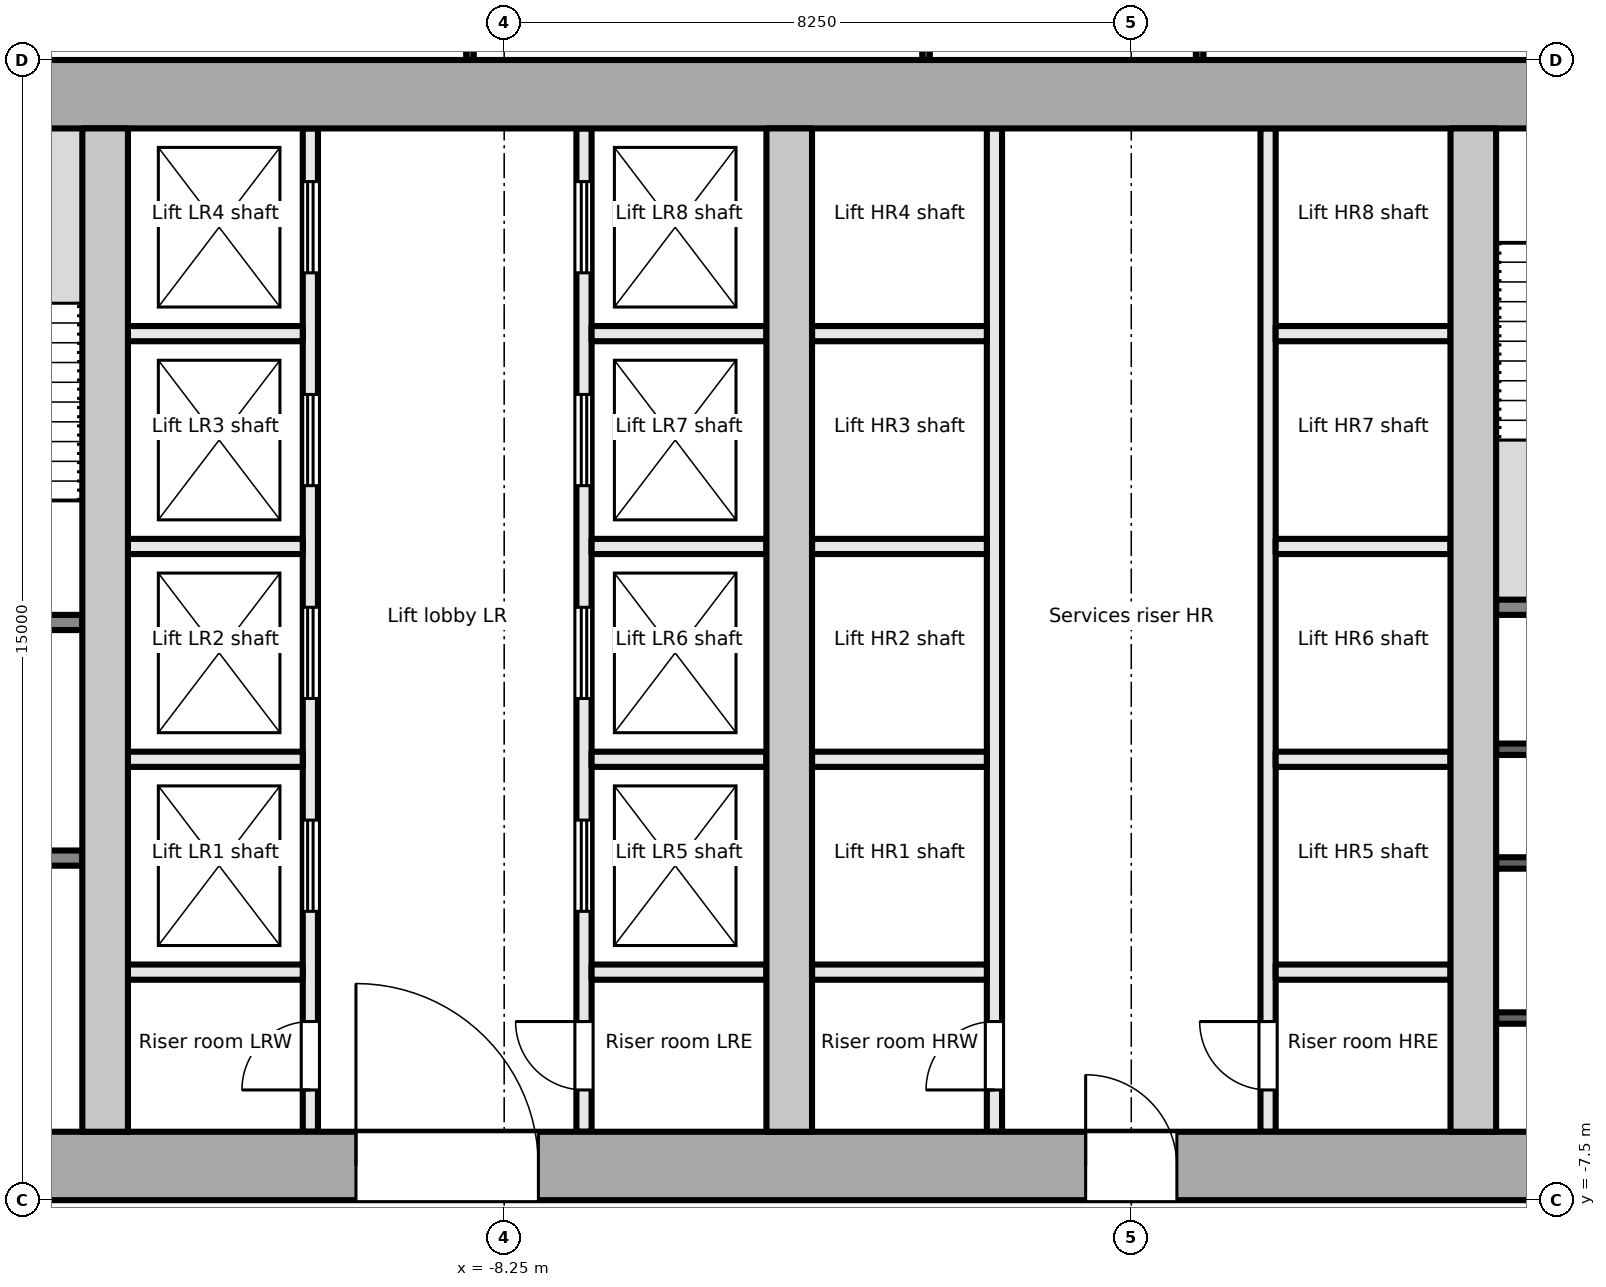
"""IFC4 building model, lengths in metres.
Left out: names, types, materials, properties, quantities, classifications, styles, units other than length and angle.
Written with IfcOpenShell. Run it as: python <this file> out.ifc"""

import sys

from ifc_helpers import new_model, si_unit, direction, frame, frame_2d, origin, place, context, subcontext, project, spatial, rectangle, extrude, element, fill, save


model = new_model("IFC4")
c1 = context("Model", 3, precision=1e-05, world=origin(), true_north=direction((0.0, 1.0)))
c2 = subcontext(c1, "Body", "Model", "MODEL_VIEW")
j1 = project(units=[si_unit("LENGTHUNIT", "METRE"), si_unit("PLANEANGLEUNIT", "RADIAN")], contexts=[c1])
p1 = place(None, origin())
s1 = spatial("IfcSite", under=j1, at=p1, CompositionType="ELEMENT")
p2 = place(p1, origin())
s2 = spatial("IfcBuilding", under=s1, at=p2, CompositionType="ELEMENT")
p3 = place(p2, frame((0.0, 0.0, 134.1)))
s3 = spatial("IfcBuildingStorey", under=s2, at=p3, CompositionType="ELEMENT", Elevation=134.1)
p4 = place(p3, frame((-18.0, -7.05, -0.2), z_axis=(0.0, 0.0, 1.0), x_axis=(1.0, 0.0, 0.0)))
e1 = element("IfcWall", 1, at=p4, inside=s3, PredefinedType="SHEAR", context=c2, shape_type="SweptSolid", body=[
    extrude(rectangle(XDim=36.0, YDim=0.9, at=frame_2d((18.0, 0.0))), origin(), (0.0, 0.0, 1.0), 4.0),
])
p5 = place(p4, frame((7.8, 0.0, 0.2)))
e2 = element("IfcOpeningElement", 2, at=p5, cuts=e1, PredefinedType="OPENING", context=c2, shape_type="SweptSolid", body=[
    extrude(rectangle(XDim=2.4, YDim=2.1, at=frame_2d((1.2, 1.05))), frame((0.0, 0.46, 0.0), z_axis=(0.0, -1.0, 0.0), x_axis=(1.0, 0.0, 0.0)), (0.0, 0.0, 1.0), 0.921),
])
p6 = place(p4, frame((17.4, 0.0, 0.2)))
e3 = element("IfcOpeningElement", 3, at=p6, cuts=e1, PredefinedType="OPENING", context=c2, shape_type="SweptSolid", body=[
    extrude(rectangle(XDim=1.2, YDim=2.1, at=frame_2d((0.6, 1.05))), frame((0.0, 0.46, 0.0), z_axis=(0.0, -1.0, 0.0), x_axis=(1.0, 0.0, 0.0)), (0.0, 0.0, 1.0), 0.921),
])
p7 = place(p4, frame((26.1, 0.0, 0.2)))
e4 = element("IfcOpeningElement", 4, at=p7, cuts=e1, PredefinedType="OPENING", context=c2, shape_type="SweptSolid", body=[
    extrude(rectangle(XDim=2.4, YDim=2.1, at=frame_2d((1.2, 1.05))), frame((0.0, 0.46, 0.0), z_axis=(0.0, -1.0, 0.0), x_axis=(1.0, 0.0, 0.0)), (0.0, 0.0, 1.0), 0.921),
])
p8 = place(p3, frame((-18.0, 7.05, -0.2), z_axis=(0.0, 0.0, 1.0), x_axis=(1.0, 0.0, 0.0)))
e5 = element("IfcWall", 5, at=p8, inside=s3, PredefinedType="SHEAR", context=c2, shape_type="SweptSolid", body=[
    extrude(rectangle(XDim=36.0, YDim=0.9, at=frame_2d((18.0, 0.0))), origin(), (0.0, 0.0, 1.0), 4.0),
])
for number, where, z_axis, x_axis in (
    (6, (-13.5, -6.6, -0.2), (0.0, 0.0, 1.0), (0.0, 1.0, 0.0)),
    (7, (-4.5, -6.6, -0.2), (0.0, 0.0, 1.0), (0.0, 1.0, 0.0)),
    (8, (4.5, -6.6, -0.2), (0.0, 0.0, 1.0), (0.0, 1.0, 0.0)),
):
    element("IfcWall", number, at=place(p3, frame(where, z_axis=z_axis, x_axis=x_axis)), inside=s3, PredefinedType="SHEAR", context=c2, shape_type="SweptSolid", body=[
        extrude(rectangle(XDim=13.2, YDim=0.6, at=frame_2d((6.6, 0.0))), origin(), (0.0, 0.0, 1.0), 4.0),
    ])
p9 = place(p3, frame((-17.1, -3.0, 0.0), z_axis=(0.0, 0.0, 1.0), x_axis=(1.0, 0.0, 0.0)))
e9 = element("IfcWall", 9, at=p9, inside=s3, PredefinedType="PARTITIONING", context=c2, shape_type="SweptSolid", body=[
    extrude(rectangle(XDim=3.3, YDim=0.2, at=frame_2d((1.65, 0.0))), origin(), (0.0, 0.0, 1.0), 3.8),
])
p10 = place(p9, frame((1.1, 0.0, 0.0)))
e10 = element("IfcOpeningElement", 10, at=p10, cuts=e9, PredefinedType="OPENING", context=c2, shape_type="SweptSolid", body=[
    extrude(rectangle(XDim=1.1, YDim=2.1, at=frame_2d((0.55, 1.05))), frame((0.0, 0.111, 0.0), z_axis=(0.0, -1.0, 0.0), x_axis=(1.0, 0.0, 0.0)), (0.0, 0.0, 1.0), 0.221),
])
p11 = place(p3, frame((-17.1, 0.1, 0.0), z_axis=(0.0, 0.0, 1.0), x_axis=(1.0, 0.0, 0.0)))
e11 = element("IfcWall", 11, at=p11, inside=s3, PredefinedType="PARTITIONING", context=c2, shape_type="SweptSolid", body=[
    extrude(rectangle(XDim=3.3, YDim=0.2, at=frame_2d((1.65, 0.0))), origin(), (0.0, 0.0, 1.0), 3.8),
])
p12 = place(p11, frame((1.1, 0.0, 0.0)))
e12 = element("IfcOpeningElement", 12, at=p12, cuts=e11, PredefinedType="OPENING", context=c2, shape_type="SweptSolid", body=[
    extrude(rectangle(XDim=1.1, YDim=2.1, at=frame_2d((0.55, 1.05))), frame((0.0, 0.111, 0.0), z_axis=(0.0, -1.0, 0.0), x_axis=(1.0, 0.0, 0.0)), (0.0, 0.0, 1.0), 0.221),
])
p13 = place(p3, frame((-10.8, -6.6, 0.0), z_axis=(0.0, 0.0, 1.0), x_axis=(0.0, 1.0, 0.0)))
e13 = element("IfcWall", 13, at=p13, inside=s3, PredefinedType="PARTITIONING", context=c2, shape_type="SweptSolid", body=[
    extrude(rectangle(XDim=13.2, YDim=0.2, at=frame_2d((6.6, 0.0))), origin(), (0.0, 0.0, 1.0), 3.8),
])
p14 = place(p13, frame((0.55, 0.0, 0.0)))
e14 = element("IfcOpeningElement", 14, at=p14, cuts=e13, PredefinedType="OPENING", context=c2, shape_type="SweptSolid", body=[
    extrude(rectangle(XDim=0.9, YDim=2.1, at=frame_2d((0.45, 1.05))), frame((0.0, 0.111, 0.0), z_axis=(0.0, -1.0, 0.0), x_axis=(1.0, 0.0, 0.0)), (0.0, 0.0, 1.0), 0.221),
])
p15 = place(p13, frame((2.9, 0.0, 0.0)))
e15 = element("IfcOpeningElement", 15, at=p15, cuts=e13, PredefinedType="OPENING", context=c2, shape_type="SweptSolid", body=[
    extrude(rectangle(XDim=1.2, YDim=2.1, at=frame_2d((0.6, 1.05))), frame((0.0, 0.111, 0.0), z_axis=(0.0, -1.0, 0.0), x_axis=(1.0, 0.0, 0.0)), (0.0, 0.0, 1.0), 0.221),
])
p16 = place(p13, frame((5.7, 0.0, 0.0)))
e16 = element("IfcOpeningElement", 16, at=p16, cuts=e13, PredefinedType="OPENING", context=c2, shape_type="SweptSolid", body=[
    extrude(rectangle(XDim=1.2, YDim=2.1, at=frame_2d((0.6, 1.05))), frame((0.0, 0.111, 0.0), z_axis=(0.0, -1.0, 0.0), x_axis=(1.0, 0.0, 0.0)), (0.0, 0.0, 1.0), 0.221),
])
p17 = place(p13, frame((8.5, 0.0, 0.0)))
e17 = element("IfcOpeningElement", 17, at=p17, cuts=e13, PredefinedType="OPENING", context=c2, shape_type="SweptSolid", body=[
    extrude(rectangle(XDim=1.2, YDim=2.1, at=frame_2d((0.6, 1.05))), frame((0.0, 0.111, 0.0), z_axis=(0.0, -1.0, 0.0), x_axis=(1.0, 0.0, 0.0)), (0.0, 0.0, 1.0), 0.221),
])
p18 = place(p13, frame((11.3, 0.0, 0.0)))
e18 = element("IfcOpeningElement", 18, at=p18, cuts=e13, PredefinedType="OPENING", context=c2, shape_type="SweptSolid", body=[
    extrude(rectangle(XDim=1.2, YDim=2.1, at=frame_2d((0.6, 1.05))), frame((0.0, 0.111, 0.0), z_axis=(0.0, -1.0, 0.0), x_axis=(1.0, 0.0, 0.0)), (0.0, 0.0, 1.0), 0.221),
])
p19 = place(p3, frame((-7.2, -6.6, 0.0), z_axis=(0.0, 0.0, 1.0), x_axis=(0.0, 1.0, 0.0)))
e19 = element("IfcWall", 19, at=p19, inside=s3, PredefinedType="PARTITIONING", context=c2, shape_type="SweptSolid", body=[
    extrude(rectangle(XDim=13.2, YDim=0.2, at=frame_2d((6.6, 0.0))), origin(), (0.0, 0.0, 1.0), 3.8),
])
p20 = place(p19, frame((0.55, 0.0, 0.0)))
e20 = element("IfcOpeningElement", 20, at=p20, cuts=e19, PredefinedType="OPENING", context=c2, shape_type="SweptSolid", body=[
    extrude(rectangle(XDim=0.9, YDim=2.1, at=frame_2d((0.45, 1.05))), frame((0.0, 0.111, 0.0), z_axis=(0.0, -1.0, 0.0), x_axis=(1.0, 0.0, 0.0)), (0.0, 0.0, 1.0), 0.221),
])
p21 = place(p19, frame((2.9, 0.0, 0.0)))
e21 = element("IfcOpeningElement", 21, at=p21, cuts=e19, PredefinedType="OPENING", context=c2, shape_type="SweptSolid", body=[
    extrude(rectangle(XDim=1.2, YDim=2.1, at=frame_2d((0.6, 1.05))), frame((0.0, 0.111, 0.0), z_axis=(0.0, -1.0, 0.0), x_axis=(1.0, 0.0, 0.0)), (0.0, 0.0, 1.0), 0.221),
])
p22 = place(p19, frame((5.7, 0.0, 0.0)))
e22 = element("IfcOpeningElement", 22, at=p22, cuts=e19, PredefinedType="OPENING", context=c2, shape_type="SweptSolid", body=[
    extrude(rectangle(XDim=1.2, YDim=2.1, at=frame_2d((0.6, 1.05))), frame((0.0, 0.111, 0.0), z_axis=(0.0, -1.0, 0.0), x_axis=(1.0, 0.0, 0.0)), (0.0, 0.0, 1.0), 0.221),
])
p23 = place(p19, frame((8.5, 0.0, 0.0)))
e23 = element("IfcOpeningElement", 23, at=p23, cuts=e19, PredefinedType="OPENING", context=c2, shape_type="SweptSolid", body=[
    extrude(rectangle(XDim=1.2, YDim=2.1, at=frame_2d((0.6, 1.05))), frame((0.0, 0.111, 0.0), z_axis=(0.0, -1.0, 0.0), x_axis=(1.0, 0.0, 0.0)), (0.0, 0.0, 1.0), 0.221),
])
p24 = place(p19, frame((11.3, 0.0, 0.0)))
e24 = element("IfcOpeningElement", 24, at=p24, cuts=e19, PredefinedType="OPENING", context=c2, shape_type="SweptSolid", body=[
    extrude(rectangle(XDim=1.2, YDim=2.1, at=frame_2d((0.6, 1.05))), frame((0.0, 0.111, 0.0), z_axis=(0.0, -1.0, 0.0), x_axis=(1.0, 0.0, 0.0)), (0.0, 0.0, 1.0), 0.221),
])
for number, where, z_axis, x_axis in (
    (25, (-13.2, -1.7, 0.0), (0.0, 0.0, 1.0), (1.0, 0.0, 0.0)),
    (26, (-13.2, 1.1, 0.0), (0.0, 0.0, 1.0), (1.0, 0.0, 0.0)),
    (27, (-13.2, 3.9, 0.0), (0.0, 0.0, 1.0), (1.0, 0.0, 0.0)),
    (28, (-13.2, -4.5, 0.0), (0.0, 0.0, 1.0), (1.0, 0.0, 0.0)),
    (29, (-7.1, -1.7, 0.0), (0.0, 0.0, 1.0), (1.0, 0.0, 0.0)),
    (30, (-7.1, 1.1, 0.0), (0.0, 0.0, 1.0), (1.0, 0.0, 0.0)),
    (31, (-7.1, 3.9, 0.0), (0.0, 0.0, 1.0), (1.0, 0.0, 0.0)),
    (32, (-7.1, -4.5, 0.0), (0.0, 0.0, 1.0), (1.0, 0.0, 0.0)),
):
    element("IfcWall", number, at=place(p3, frame(where, z_axis=z_axis, x_axis=x_axis)), inside=s3, PredefinedType="PARTITIONING", context=c2, shape_type="SweptSolid", body=[
        extrude(rectangle(XDim=2.3, YDim=0.2, at=frame_2d((1.15, 0.0))), origin(), (0.0, 0.0, 1.0), 3.8),
    ])
p25 = place(p3, frame((-1.8, -6.6, 0.0), z_axis=(0.0, 0.0, 1.0), x_axis=(0.0, 1.0, 0.0)))
e33 = element("IfcWall", 33, at=p25, inside=s3, PredefinedType="PARTITIONING", context=c2, shape_type="SweptSolid", body=[
    extrude(rectangle(XDim=13.2, YDim=0.2, at=frame_2d((6.6, 0.0))), origin(), (0.0, 0.0, 1.0), 3.8),
])
p26 = place(p25, frame((0.55, 0.0, 0.0)))
e34 = element("IfcOpeningElement", 34, at=p26, cuts=e33, PredefinedType="OPENING", context=c2, shape_type="SweptSolid", body=[
    extrude(rectangle(XDim=0.9, YDim=2.1, at=frame_2d((0.45, 1.05))), frame((0.0, 0.111, 0.0), z_axis=(0.0, -1.0, 0.0), x_axis=(1.0, 0.0, 0.0)), (0.0, 0.0, 1.0), 0.221),
])
p27 = place(p3, frame((1.8, -6.6, 0.0), z_axis=(0.0, 0.0, 1.0), x_axis=(0.0, 1.0, 0.0)))
e35 = element("IfcWall", 35, at=p27, inside=s3, PredefinedType="PARTITIONING", context=c2, shape_type="SweptSolid", body=[
    extrude(rectangle(XDim=13.2, YDim=0.2, at=frame_2d((6.6, 0.0))), origin(), (0.0, 0.0, 1.0), 3.8),
])
p28 = place(p27, frame((0.55, 0.0, 0.0)))
e36 = element("IfcOpeningElement", 36, at=p28, cuts=e35, PredefinedType="OPENING", context=c2, shape_type="SweptSolid", body=[
    extrude(rectangle(XDim=0.9, YDim=2.1, at=frame_2d((0.45, 1.05))), frame((0.0, 0.111, 0.0), z_axis=(0.0, -1.0, 0.0), x_axis=(1.0, 0.0, 0.0)), (0.0, 0.0, 1.0), 0.221),
])
for number, where, z_axis, x_axis in (
    (37, (-4.2, -1.7, 0.0), (0.0, 0.0, 1.0), (1.0, 0.0, 0.0)),
    (38, (-4.2, 1.1, 0.0), (0.0, 0.0, 1.0), (1.0, 0.0, 0.0)),
    (39, (-4.2, 3.9, 0.0), (0.0, 0.0, 1.0), (1.0, 0.0, 0.0)),
    (40, (-4.2, -4.5, 0.0), (0.0, 0.0, 1.0), (1.0, 0.0, 0.0)),
    (41, (1.9, -1.7, 0.0), (0.0, 0.0, 1.0), (1.0, 0.0, 0.0)),
    (42, (1.9, 1.1, 0.0), (0.0, 0.0, 1.0), (1.0, 0.0, 0.0)),
    (43, (1.9, 3.9, 0.0), (0.0, 0.0, 1.0), (1.0, 0.0, 0.0)),
    (44, (1.9, -4.5, 0.0), (0.0, 0.0, 1.0), (1.0, 0.0, 0.0)),
):
    element("IfcWall", number, at=place(p3, frame(where, z_axis=z_axis, x_axis=x_axis)), inside=s3, PredefinedType="PARTITIONING", context=c2, shape_type="SweptSolid", body=[
        extrude(rectangle(XDim=2.3, YDim=0.2, at=frame_2d((1.15, 0.0))), origin(), (0.0, 0.0, 1.0), 3.8),
    ])
p29 = place(p3, frame((4.8, 0.3, 0.0), z_axis=(0.0, 0.0, 1.0), x_axis=(1.0, 0.0, 0.0)))
e45 = element("IfcWall", 45, at=p29, inside=s3, PredefinedType="PARTITIONING", context=c2, shape_type="SweptSolid", body=[
    extrude(rectangle(XDim=3.15, YDim=0.2, at=frame_2d((1.575, 0.0))), origin(), (0.0, 0.0, 1.0), 3.8),
])
for number, where, z_axis, x_axis in (
    (46, (4.8, -5.104, 0.0), (0.0, 0.0, 1.0), (1.0, 0.0, 0.0)),
    (47, (4.8, -3.064, 0.0), (0.0, 0.0, 1.0), (1.0, 0.0, 0.0)),
    (48, (4.8, -1.568, 0.0), (0.0, 0.0, 1.0), (1.0, 0.0, 0.0)),
):
    element("IfcWall", number, at=place(p3, frame(where, z_axis=z_axis, x_axis=x_axis)), inside=s3, PredefinedType="PARTITIONING", context=c2, shape_type="SweptSolid", body=[
        extrude(rectangle(XDim=3.15, YDim=0.15, at=frame_2d((1.575, 0.0))), origin(), (0.0, 0.0, 1.0), 3.8),
    ])
p30 = place(p3, frame((-8.7, 7.5, 0.0), z_axis=(0.0, 0.0, 1.0), x_axis=(0.0, 1.0, 0.0)))
e49 = element("IfcWall", 49, at=p30, inside=s3, PredefinedType="PARTITIONING", context=c2, shape_type="SweptSolid", body=[
    extrude(rectangle(XDim=2.95, YDim=0.1, at=frame_2d((1.475, 0.0))), origin(), (0.0, 0.0, 1.0), 3.8),
])
p31 = place(p30, frame((0.575, 0.0, 0.9)))
e50 = element("IfcOpeningElement", 50, at=p31, cuts=e49, PredefinedType="OPENING", context=c2, shape_type="SweptSolid", body=[
    extrude(rectangle(XDim=1.8, YDim=1.2, at=frame_2d((0.9, 0.6))), frame((0.0, 0.061, 0.0), z_axis=(0.0, -1.0, 0.0), x_axis=(1.0, 0.0, 0.0)), (0.0, 0.0, 1.0), 0.121),
])
for number, where, z_axis, x_axis in (
    (51, (-2.7, 10.45, 0.0), (0.0, 0.0, 1.0), (0.0, -1.0, 0.0)),
    (52, (0.9, 10.45, 0.0), (0.0, 0.0, 1.0), (0.0, -1.0, 0.0)),
):
    element("IfcWall", number, at=place(p3, frame(where, z_axis=z_axis, x_axis=x_axis)), inside=s3, PredefinedType="PARTITIONING", context=c2, shape_type="SweptSolid", body=[
        extrude(rectangle(XDim=2.95, YDim=0.1, at=frame_2d((1.475, 0.0))), origin(), (0.0, 0.0, 1.0), 3.8),
    ])
p32 = place(p14, origin())
e53 = element("IfcDoor", 53, at=p32, inside=s3, OperationType="SINGLE_SWING_LEFT", PredefinedType="DOOR", context=c2, shape_type="SweptSolid", body=[
    extrude(rectangle(XDim=0.9, YDim=2.1, at=frame_2d((0.45, 1.05))), frame((0.0, 0.025, 0.0), z_axis=(0.0, -1.0, 0.0), x_axis=(1.0, 0.0, 0.0)), (0.0, 0.0, 1.0), 0.05),
])
fill(e14, e53)
p33 = place(p15, origin())
e54 = element("IfcDoor", 54, at=p33, inside=s3, OperationType="DOUBLE_DOOR_SLIDING", PredefinedType="DOOR", context=c2, shape_type="SweptSolid", body=[
    extrude(rectangle(XDim=1.2, YDim=2.1, at=frame_2d((0.6, 1.05))), frame((0.0, 0.025, 0.0), z_axis=(0.0, -1.0, 0.0), x_axis=(1.0, 0.0, 0.0)), (0.0, 0.0, 1.0), 0.05),
])
fill(e15, e54)
p34 = place(p16, origin())
e55 = element("IfcDoor", 55, at=p34, inside=s3, OperationType="DOUBLE_DOOR_SLIDING", PredefinedType="DOOR", context=c2, shape_type="SweptSolid", body=[
    extrude(rectangle(XDim=1.2, YDim=2.1, at=frame_2d((0.6, 1.05))), frame((0.0, 0.025, 0.0), z_axis=(0.0, -1.0, 0.0), x_axis=(1.0, 0.0, 0.0)), (0.0, 0.0, 1.0), 0.05),
])
fill(e16, e55)
p35 = place(p17, origin())
e56 = element("IfcDoor", 56, at=p35, inside=s3, OperationType="DOUBLE_DOOR_SLIDING", PredefinedType="DOOR", context=c2, shape_type="SweptSolid", body=[
    extrude(rectangle(XDim=1.2, YDim=2.1, at=frame_2d((0.6, 1.05))), frame((0.0, 0.025, 0.0), z_axis=(0.0, -1.0, 0.0), x_axis=(1.0, 0.0, 0.0)), (0.0, 0.0, 1.0), 0.05),
])
fill(e17, e56)
p36 = place(p18, origin())
e57 = element("IfcDoor", 57, at=p36, inside=s3, OperationType="DOUBLE_DOOR_SLIDING", PredefinedType="DOOR", context=c2, shape_type="SweptSolid", body=[
    extrude(rectangle(XDim=1.2, YDim=2.1, at=frame_2d((0.6, 1.05))), frame((0.0, 0.025, 0.0), z_axis=(0.0, -1.0, 0.0), x_axis=(1.0, 0.0, 0.0)), (0.0, 0.0, 1.0), 0.05),
])
fill(e18, e57)
p37 = place(p20, origin())
e58 = element("IfcDoor", 58, at=p37, inside=s3, OperationType="SINGLE_SWING_RIGHT", PredefinedType="DOOR", context=c2, shape_type="SweptSolid", body=[
    extrude(rectangle(XDim=0.9, YDim=2.1, at=frame_2d((0.45, 1.05))), frame((0.0, 0.025, 0.0), z_axis=(0.0, -1.0, 0.0), x_axis=(1.0, 0.0, 0.0)), (0.0, 0.0, 1.0), 0.05),
])
fill(e20, e58)
p38 = place(p21, origin())
e59 = element("IfcDoor", 59, at=p38, inside=s3, OperationType="DOUBLE_DOOR_SLIDING", PredefinedType="DOOR", context=c2, shape_type="SweptSolid", body=[
    extrude(rectangle(XDim=1.2, YDim=2.1, at=frame_2d((0.6, 1.05))), frame((0.0, 0.025, 0.0), z_axis=(0.0, -1.0, 0.0), x_axis=(1.0, 0.0, 0.0)), (0.0, 0.0, 1.0), 0.05),
])
fill(e21, e59)
p39 = place(p22, origin())
e60 = element("IfcDoor", 60, at=p39, inside=s3, OperationType="DOUBLE_DOOR_SLIDING", PredefinedType="DOOR", context=c2, shape_type="SweptSolid", body=[
    extrude(rectangle(XDim=1.2, YDim=2.1, at=frame_2d((0.6, 1.05))), frame((0.0, 0.025, 0.0), z_axis=(0.0, -1.0, 0.0), x_axis=(1.0, 0.0, 0.0)), (0.0, 0.0, 1.0), 0.05),
])
fill(e22, e60)
p40 = place(p23, origin())
e61 = element("IfcDoor", 61, at=p40, inside=s3, OperationType="DOUBLE_DOOR_SLIDING", PredefinedType="DOOR", context=c2, shape_type="SweptSolid", body=[
    extrude(rectangle(XDim=1.2, YDim=2.1, at=frame_2d((0.6, 1.05))), frame((0.0, 0.025, 0.0), z_axis=(0.0, -1.0, 0.0), x_axis=(1.0, 0.0, 0.0)), (0.0, 0.0, 1.0), 0.05),
])
fill(e23, e61)
p41 = place(p24, origin())
e62 = element("IfcDoor", 62, at=p41, inside=s3, OperationType="DOUBLE_DOOR_SLIDING", PredefinedType="DOOR", context=c2, shape_type="SweptSolid", body=[
    extrude(rectangle(XDim=1.2, YDim=2.1, at=frame_2d((0.6, 1.05))), frame((0.0, 0.025, 0.0), z_axis=(0.0, -1.0, 0.0), x_axis=(1.0, 0.0, 0.0)), (0.0, 0.0, 1.0), 0.05),
])
fill(e24, e62)
p42 = place(p5, origin())
e63 = element("IfcDoor", 63, at=p42, inside=s3, OperationType="DOUBLE_DOOR_DOUBLE_SWING", PredefinedType="DOOR", context=c2, shape_type="SweptSolid", body=[
    extrude(rectangle(XDim=2.4, YDim=2.1, at=frame_2d((1.2, 1.05))), frame((0.0, 0.025, 0.0), z_axis=(0.0, -1.0, 0.0), x_axis=(1.0, 0.0, 0.0)), (0.0, 0.0, 1.0), 0.05),
])
fill(e2, e63)
p43 = place(p26, origin())
e64 = element("IfcDoor", 64, at=p43, inside=s3, OperationType="SINGLE_SWING_LEFT", PredefinedType="DOOR", context=c2, shape_type="SweptSolid", body=[
    extrude(rectangle(XDim=0.9, YDim=2.1, at=frame_2d((0.45, 1.05))), frame((0.0, 0.025, 0.0), z_axis=(0.0, -1.0, 0.0), x_axis=(1.0, 0.0, 0.0)), (0.0, 0.0, 1.0), 0.05),
])
fill(e34, e64)
p44 = place(p28, origin())
e65 = element("IfcDoor", 65, at=p44, inside=s3, OperationType="SINGLE_SWING_RIGHT", PredefinedType="DOOR", context=c2, shape_type="SweptSolid", body=[
    extrude(rectangle(XDim=0.9, YDim=2.1, at=frame_2d((0.45, 1.05))), frame((0.0, 0.025, 0.0), z_axis=(0.0, -1.0, 0.0), x_axis=(1.0, 0.0, 0.0)), (0.0, 0.0, 1.0), 0.05),
])
fill(e36, e65)
p45 = place(p6, origin())
e66 = element("IfcDoor", 66, at=p45, inside=s3, OperationType="SINGLE_SWING_LEFT", PredefinedType="DOOR", context=c2, shape_type="SweptSolid", body=[
    extrude(rectangle(XDim=1.2, YDim=2.1, at=frame_2d((0.6, 1.05))), frame((0.0, 0.025, 0.0), z_axis=(0.0, -1.0, 0.0), x_axis=(1.0, 0.0, 0.0)), (0.0, 0.0, 1.0), 0.05),
])
fill(e3, e66)
save(model, sys.argv[1])
